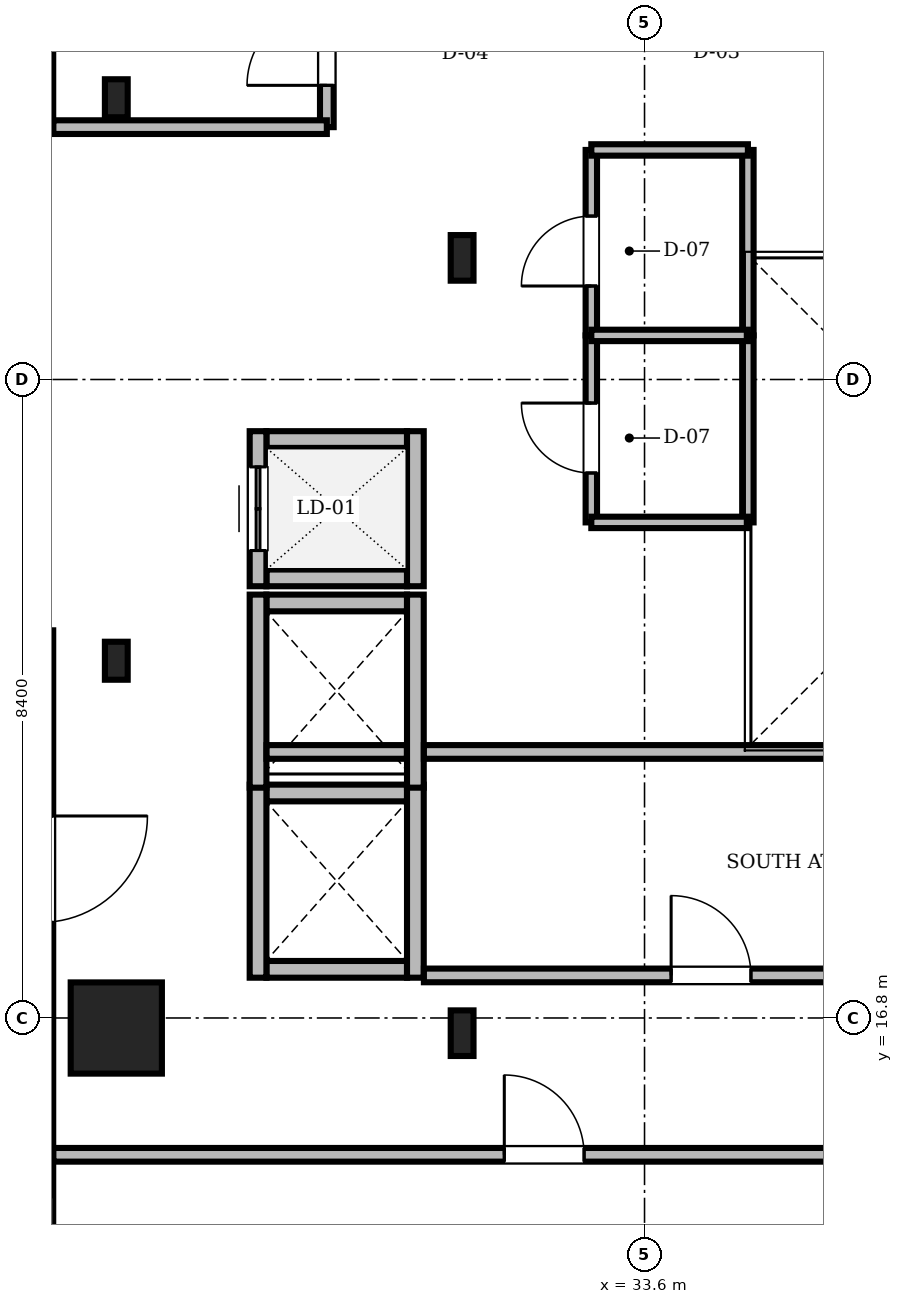
"""IFC4 building model, lengths in metres.
Left out: names, types, materials, properties, quantities, classifications, styles, units other than length and angle.
Written with IfcOpenShell. Run it as: python <this file> out.ifc"""

import sys

from ifc_helpers import new_model, si_unit, direction, frame, frame_2d, origin, origin_2d, place, context, subcontext, project, spatial, rectangle, i_section, extrude, source, transform, mapped, element, fill, save


model = new_model("IFC4")
c1 = context("Model", 3, precision=1e-05, world=origin(), true_north=direction((0.0, 1.0)))
c2 = subcontext(c1, "Body", "Model", "MODEL_VIEW")
j1 = project(units=[si_unit("LENGTHUNIT", "METRE"), si_unit("PLANEANGLEUNIT", "RADIAN")], contexts=[c1])
p1 = place(None, origin())
s1 = spatial("IfcSite", under=j1, at=p1, CompositionType="ELEMENT")
p2 = place(p1, origin())
s2 = spatial("IfcBuilding", under=s1, at=p2, CompositionType="ELEMENT")
p3 = place(p2, frame((0.0, 0.0, 296.15)))
s3 = spatial("IfcBuildingStorey", under=s2, at=p3, CompositionType="ELEMENT", Elevation=296.15)
m1 = source(origin(), c2, "Body", "SweptSolid", [
    extrude(i_section(OverallWidth=0.3, OverallDepth=0.6, WebThickness=0.015, FlangeThickness=0.03, FilletRadius=0.027, at=origin_2d()), origin(), (0.0, 0.0, 1.0), 4.7),
])
for number, where, z_axis, x_axis in (
    (1, (31.2, 16.6, 0.0), (0.0, 0.0, 1.0), (1.0, 0.0, 0.0)),
    (2, (31.2, 26.8, 0.0), (0.0, 0.0, 1.0), (1.0, 0.0, 0.0)),
):
    element("IfcColumn", number, at=place(p3, frame(where, z_axis=z_axis, x_axis=x_axis)), inside=s3, PredefinedType="COLUMN", context=c2, shape_type="MappedRepresentation", body=[
        mapped(m1, transform((0.0, 0.0, 0.0), scale=1.0)),
    ])
m2 = source(origin(), c2, "Body", "SweptSolid", [
    extrude(rectangle(XDim=1.2, YDim=1.2, at=origin_2d()), origin(), (0.0, 0.0, 1.0), 4.738),
])
p4 = place(p3, frame((26.65, 16.668, 0.0), z_axis=(0.113978992753, 0.054103952256, 0.992008846514), x_axis=(-0.428823545912, 0.903388270054, 0.0)))
e3 = element("IfcColumn", 3, at=p4, inside=s3, PredefinedType="COLUMN", context=c2, shape_type="MappedRepresentation", body=[
    mapped(m2, transform((0.0, 0.0, 0.0), scale=1.0)),
])
m3 = source(origin(), c2, "Body", "SweptSolid", [
    extrude(i_section(OverallWidth=0.3, OverallDepth=0.5, WebThickness=0.014, FlangeThickness=0.028, FilletRadius=0.027, at=origin_2d()), origin(), (0.0, 0.0, 1.0), 4.731),
])
for number, where, z_axis, x_axis in (
    (4, (26.65, 28.9, 0.0), (0.114, 0.0, 0.993), (0.0, 1.0, 0.0)),
    (5, (26.65, 21.5, 0.0), (0.114, 0.0, 0.993), (0.0, 1.0, 0.0)),
):
    element("IfcColumn", number, at=place(p3, frame(where, z_axis=z_axis, x_axis=x_axis)), inside=s3, PredefinedType="COLUMN", context=c2, shape_type="MappedRepresentation", body=[
        mapped(m3, transform((0.0, 0.0, 0.0), scale=1.0)),
    ])
m4 = source(origin(), c2, "Body", "SweptSolid", [
    extrude(rectangle(XDim=10.92, YDim=0.32, at=frame_2d((5.46, 0.0))), origin(), (0.0, 0.0, 1.0), 4.7),
])
p5 = place(p3, frame((25.66, 39.42, 0.0), z_axis=(0.0, 0.0, 1.0), x_axis=(0.0, -1.0, 0.0)))
e6 = element("IfcWall", 6, at=p5, inside=s3, PredefinedType="SOLIDWALL", context=c2, shape_type="MappedRepresentation", body=[
    mapped(m4, transform((0.0, 0.0, 0.0), scale=1.0)),
])
m5 = source(origin(), c2, "Body", "SweptSolid", [
    extrude(rectangle(XDim=2.4, YDim=3.2, at=frame_2d((1.2, 1.6))), frame((0.0, 0.17, 0.0), z_axis=(0.0, -1.0, 0.0), x_axis=(1.0, 0.0, 0.0)), (0.0, 0.0, 1.0), 0.34),
])
p6 = place(p5, frame((1.969, 0.0, 0.72)))
e7 = element("IfcOpeningElement", 7, at=p6, cuts=e6, PredefinedType="OPENING", context=c2, shape_type="MappedRepresentation", body=[
    mapped(m5, transform((0.0, 0.0, 0.0), scale=1.0)),
])
p7 = place(p3, frame((25.66, 21.9, 0.0), z_axis=(0.0, 0.0, 1.0), x_axis=(0.0, -1.0, 0.0)))
e8 = element("IfcWall", 8, at=p7, inside=s3, PredefinedType="SOLIDWALL", context=c2, shape_type="MappedRepresentation", body=[
    mapped(m4, transform((0.0, 0.0, 0.0), scale=1.0)),
])
m6 = source(origin(), c2, "Body", "SweptSolid", [
    extrude(rectangle(XDim=1.4, YDim=2.3, at=frame_2d((0.7, 1.15))), frame((0.0, 0.17, 0.0), z_axis=(0.0, -1.0, 0.0), x_axis=(1.0, 0.0, 0.0)), (0.0, 0.0, 1.0), 0.34),
])
p8 = place(p7, frame((2.442, 0.0, 0.0)))
e9 = element("IfcOpeningElement", 9, at=p8, cuts=e8, PredefinedType="OPENING", context=c2, shape_type="MappedRepresentation", body=[
    mapped(m6, transform((0.0, 0.0, 0.0), scale=1.0)),
])
p9 = place(p7, frame((7.451, 0.0, 0.72)))
e10 = element("IfcOpeningElement", 10, at=p9, cuts=e8, PredefinedType="OPENING", context=c2, shape_type="MappedRepresentation", body=[
    mapped(m5, transform((0.0, 0.0, 0.0), scale=1.0)),
])
m7 = source(origin(), c2, "Body", "SweptSolid", [
    extrude(rectangle(XDim=1.85, YDim=0.22, at=frame_2d((0.925, 0.0))), origin(), (0.0, 0.0, 1.0), 4.142),
])
for number, where, z_axis, x_axis in (
    (11, (28.625, 17.44, 0.0), (0.0, 0.0, 1.0), (1.0, 0.0, 0.0)),
    (12, (28.625, 19.76, 0.0), (0.0, 0.0, 1.0), (1.0, 0.0, 0.0)),
):
    element("IfcWall", number, at=place(p3, frame(where, z_axis=z_axis, x_axis=x_axis)), inside=s3, PredefinedType="SOLIDWALL", context=c2, shape_type="MappedRepresentation", body=[
        mapped(m7, transform((0.0, 0.0, 0.0), scale=1.0)),
    ])
m8 = source(origin(), c2, "Body", "SweptSolid", [
    extrude(rectangle(XDim=2.54, YDim=0.22, at=frame_2d((1.27, 0.0))), origin(), (0.0, 0.0, 1.0), 4.142),
])
for number, where, z_axis, x_axis in (
    (13, (28.515, 17.33, 0.0), (0.0, 0.0, 1.0), (0.0, 1.0, 0.0)),
    (14, (30.585, 17.33, 0.0), (0.0, 0.0, 1.0), (0.0, 1.0, 0.0)),
):
    element("IfcWall", number, at=place(p3, frame(where, z_axis=z_axis, x_axis=x_axis)), inside=s3, PredefinedType="SOLIDWALL", context=c2, shape_type="MappedRepresentation", body=[
        mapped(m8, transform((0.0, 0.0, 0.0), scale=1.0)),
    ])
m9 = source(origin(), c2, "Body", "SweptSolid", [
    extrude(rectangle(XDim=1.85, YDim=0.22, at=frame_2d((0.925, 0.0))), origin(), (0.0, 0.0, 1.0), 4.7),
])
p10 = place(p3, frame((28.625, 22.26, 0.0), z_axis=(0.0, 0.0, 1.0), x_axis=(1.0, 0.0, 0.0)))
e15 = element("IfcWall", 15, at=p10, inside=s3, PredefinedType="SOLIDWALL", context=c2, shape_type="MappedRepresentation", body=[
    mapped(m9, transform((0.0, 0.0, 0.0), scale=1.0)),
])
p11 = place(p3, frame((28.515, 19.83, 0.0), z_axis=(0.0, 0.0, 1.0), x_axis=(0.0, 1.0, 0.0)))
e16 = element("IfcWall", 16, at=p11, inside=s3, PredefinedType="SOLIDWALL", context=c2, shape_type="MappedRepresentation", body=[
    mapped(m8, transform((0.0, 0.0, 0.0), scale=1.0)),
])
m10 = source(origin(), c2, "Body", "SweptSolid", [
    extrude(rectangle(XDim=2.54, YDim=0.22, at=frame_2d((1.27, 0.0))), origin(), (0.0, 0.0, 1.0), 4.7),
])
p12 = place(p3, frame((30.585, 19.83, 0.0), z_axis=(0.0, 0.0, 1.0), x_axis=(0.0, 1.0, 0.0)))
e17 = element("IfcWall", 17, at=p12, inside=s3, PredefinedType="SOLIDWALL", context=c2, shape_type="MappedRepresentation", body=[
    mapped(m10, transform((0.0, 0.0, 0.0), scale=1.0)),
])
for number, where, z_axis, x_axis in (
    (18, (28.625, 22.59, 0.0), (0.0, 0.0, 1.0), (1.0, 0.0, 0.0)),
    (19, (28.625, 24.41, 0.0), (0.0, 0.0, 1.0), (1.0, 0.0, 0.0)),
):
    element("IfcWall", number, at=place(p3, frame(where, z_axis=z_axis, x_axis=x_axis)), inside=s3, PredefinedType="SOLIDWALL", context=c2, shape_type="MappedRepresentation", body=[
        mapped(m9, transform((0.0, 0.0, 0.0), scale=1.0)),
    ])
m11 = source(origin(), c2, "Body", "SweptSolid", [
    extrude(rectangle(XDim=2.04, YDim=0.22, at=frame_2d((1.02, 0.0))), origin(), (0.0, 0.0, 1.0), 4.7),
])
p13 = place(p3, frame((28.515, 22.48, 0.0), z_axis=(0.0, 0.0, 1.0), x_axis=(0.0, 1.0, 0.0)))
e20 = element("IfcWall", 20, at=p13, inside=s3, PredefinedType="SOLIDWALL", context=c2, shape_type="MappedRepresentation", body=[
    mapped(m11, transform((0.0, 0.0, 0.0), scale=1.0)),
])
m12 = source(origin(), c2, "Body", "SweptSolid", [
    extrude(rectangle(XDim=1.1, YDim=2.2, at=frame_2d((0.55, 1.1))), frame((0.0, 0.12, 0.0), z_axis=(0.0, -1.0, 0.0), x_axis=(1.0, 0.0, 0.0)), (0.0, 0.0, 1.0), 0.24),
])
p14 = place(p13, frame((0.47, 0.0, 0.0)))
e21 = element("IfcOpeningElement", 21, at=p14, cuts=e20, PredefinedType="OPENING", context=c2, shape_type="MappedRepresentation", body=[
    mapped(m12, transform((0.0, 0.0, 0.0), scale=1.0)),
])
p15 = place(p3, frame((30.585, 22.48, 0.0), z_axis=(0.0, 0.0, 1.0), x_axis=(0.0, 1.0, 0.0)))
e22 = element("IfcWall", 22, at=p15, inside=s3, PredefinedType="SOLIDWALL", context=c2, shape_type="MappedRepresentation", body=[
    mapped(m11, transform((0.0, 0.0, 0.0), scale=1.0)),
])
m13 = source(origin(), c2, "Body", "SweptSolid", [
    extrude(rectangle(XDim=24.478, YDim=0.18, at=frame_2d((12.239, 0.0))), origin(), (0.0, 0.0, 1.0), 3.942),
])
p16 = place(p3, frame((25.822, 15.0, 0.0), z_axis=(0.0, 0.0, 1.0), x_axis=(1.0, 0.0, 0.0)))
e23 = element("IfcWall", 23, at=p16, inside=s3, PredefinedType="PARTITIONING", context=c2, shape_type="MappedRepresentation", body=[
    mapped(m13, transform((0.0, 0.0, 0.0), scale=1.0)),
])
m14 = source(origin(), c2, "Body", "SweptSolid", [
    extrude(rectangle(XDim=1.05, YDim=2.2, at=frame_2d((0.525, 1.1))), frame((0.0, 0.1, 0.0), z_axis=(0.0, -1.0, 0.0), x_axis=(1.0, 0.0, 0.0)), (0.0, 0.0, 1.0), 0.2),
])
p17 = place(p16, frame((5.933, 0.0, 0.0)))
e24 = element("IfcOpeningElement", 24, at=p17, cuts=e23, PredefinedType="OPENING", context=c2, shape_type="MappedRepresentation", body=[
    mapped(m14, transform((0.0, 0.0, 0.0), scale=1.0)),
])
p18 = place(p16, frame((17.158, 0.0, 0.0)))
e25 = element("IfcOpeningElement", 25, at=p18, cuts=e23, PredefinedType="OPENING", context=c2, shape_type="MappedRepresentation", body=[
    mapped(m14, transform((0.0, 0.0, 0.0), scale=1.0)),
])
p19 = place(p16, frame((23.228, 0.0, 0.0)))
e26 = element("IfcOpeningElement", 26, at=p19, cuts=e23, PredefinedType="OPENING", context=c2, shape_type="MappedRepresentation", body=[
    mapped(m14, transform((0.0, 0.0, 0.0), scale=1.0)),
])
m15 = source(origin(), c2, "Body", "SweptSolid", [
    extrude(rectangle(XDim=2.13, YDim=0.18, at=frame_2d((1.065, 0.0))), origin(), (0.0, 0.0, 1.0), 4.332),
])
p20 = place(p3, frame((29.42, 28.52, 0.0), z_axis=(0.0, 0.0, 1.0), x_axis=(0.0, 1.0, 0.0)))
e27 = element("IfcWall", 27, at=p20, inside=s3, PredefinedType="PARTITIONING", context=c2, shape_type="MappedRepresentation", body=[
    mapped(m15, transform((0.0, 0.0, 0.0), scale=1.0)),
])
p21 = place(p20, frame((0.55, 0.0, 0.0)))
e28 = element("IfcOpeningElement", 28, at=p21, cuts=e27, PredefinedType="OPENING", context=c2, shape_type="MappedRepresentation", body=[
    mapped(m14, transform((0.0, 0.0, 0.0), scale=1.0)),
])
m16 = source(origin(), c2, "Body", "SweptSolid", [
    extrude(rectangle(XDim=10.803, YDim=0.18, at=frame_2d((5.401, 0.0))), origin(), (0.0, 0.0, 1.0), 4.142),
])
p22 = place(p3, frame((30.697, 17.36, 0.0), z_axis=(0.0, 0.0, 1.0), x_axis=(1.0, 0.0, 0.0)))
e29 = element("IfcWall", 29, at=p22, inside=s3, PredefinedType="PARTITIONING", context=c2, shape_type="MappedRepresentation", body=[
    mapped(m16, transform((0.0, 0.0, 0.0), scale=1.0)),
])
p23 = place(p22, frame((3.253, 0.0, 0.0)))
e30 = element("IfcOpeningElement", 30, at=p23, cuts=e29, PredefinedType="OPENING", context=c2, shape_type="MappedRepresentation", body=[
    mapped(m14, transform((0.0, 0.0, 0.0), scale=1.0)),
])
m17 = source(origin(), c2, "Body", "SweptSolid", [
    extrude(rectangle(XDim=2.46, YDim=0.15, at=frame_2d((1.23, 0.0))), origin(), (0.0, 0.0, 1.0), 4.7),
])
p24 = place(p3, frame((32.9, 23.32, 0.0), z_axis=(0.0, 0.0, 1.0), x_axis=(0.0, 1.0, 0.0)))
e31 = element("IfcWall", 31, at=p24, inside=s3, PredefinedType="PARTITIONING", context=c2, shape_type="MappedRepresentation", body=[
    mapped(m17, transform((0.0, 0.0, 0.0), scale=1.0)),
])
m18 = source(origin(), c2, "Body", "SweptSolid", [
    extrude(rectangle(XDim=0.92, YDim=2.1, at=frame_2d((0.46, 1.05))), frame((0.0, 0.085, 0.0), z_axis=(0.0, -1.0, 0.0), x_axis=(1.0, 0.0, 0.0)), (0.0, 0.0, 1.0), 0.17),
])
p25 = place(p24, frame((0.65, 0.0, 0.0)))
e32 = element("IfcOpeningElement", 32, at=p25, cuts=e31, PredefinedType="OPENING", context=c2, shape_type="MappedRepresentation", body=[
    mapped(m18, transform((0.0, 0.0, 0.0), scale=1.0)),
])
m19 = source(origin(), c2, "Body", "SweptSolid", [
    extrude(rectangle(XDim=2.44, YDim=0.15, at=frame_2d((1.22, 0.0))), origin(), (0.0, 0.0, 1.0), 4.242),
])
p26 = place(p3, frame((32.9, 25.78, 0.0), z_axis=(0.0, 0.0, 1.0), x_axis=(0.0, 1.0, 0.0)))
e33 = element("IfcWall", 33, at=p26, inside=s3, PredefinedType="PARTITIONING", context=c2, shape_type="MappedRepresentation", body=[
    mapped(m19, transform((0.0, 0.0, 0.0), scale=1.0)),
])
p27 = place(p26, frame((0.65, 0.0, 0.0)))
e34 = element("IfcOpeningElement", 34, at=p27, cuts=e33, PredefinedType="OPENING", context=c2, shape_type="MappedRepresentation", body=[
    mapped(m18, transform((0.0, 0.0, 0.0), scale=1.0)),
])
m20 = source(origin(), c2, "Body", "SweptSolid", [
    extrude(rectangle(XDim=1.846, YDim=0.18, at=frame_2d((0.923, 0.0))), origin(), (0.0, 0.0, 1.0), 4.7),
])
p28 = place(p3, frame((28.627, 20.3, 0.0), z_axis=(0.0, 0.0, 1.0), x_axis=(1.0, 0.0, 0.0)))
e35 = element("IfcWall", 35, at=p28, inside=s3, PredefinedType="PARTITIONING", context=c2, shape_type="MappedRepresentation", body=[
    mapped(m20, transform((0.0, 0.0, 0.0), scale=1.0)),
])
m21 = source(origin(), c2, "Body", "SweptSolid", [
    extrude(rectangle(XDim=10.803, YDim=0.18, at=frame_2d((5.401, 0.0))), origin(), (0.0, 0.0, 1.0), 4.242),
])
p29 = place(p3, frame((30.697, 20.3, 0.0), z_axis=(0.0, 0.0, 1.0), x_axis=(1.0, 0.0, 0.0)))
e36 = element("IfcWall", 36, at=p29, inside=s3, PredefinedType="PARTITIONING", context=c2, shape_type="MappedRepresentation", body=[
    mapped(m21, transform((0.0, 0.0, 0.0), scale=1.0)),
])
m22 = source(origin(), c2, "Body", "SweptSolid", [
    extrude(rectangle(XDim=3.598, YDim=0.18, at=frame_2d((1.799, 0.0))), origin(), (0.0, 0.0, 1.0), 3.942),
])
p30 = place(p3, frame((25.822, 28.52, 0.0), z_axis=(0.0, 0.0, 1.0), x_axis=(1.0, 0.0, 0.0)))
e37 = element("IfcWall", 37, at=p30, inside=s3, PredefinedType="PARTITIONING", context=c2, shape_type="MappedRepresentation", body=[
    mapped(m22, transform((0.0, 0.0, 0.0), scale=1.0)),
])
p31 = place(p3, frame((34.96, 23.32, 0.0), z_axis=(0.0, 0.0, 1.0), x_axis=(0.0, 1.0, 0.0)))
e38 = element("IfcWall", 38, at=p31, inside=s3, PredefinedType="PARTITIONING", context=c2, shape_type="MappedRepresentation", body=[
    mapped(m17, transform((0.0, 0.0, 0.0), scale=1.0)),
])
p32 = place(p3, frame((34.96, 25.78, 0.0), z_axis=(0.0, 0.0, 1.0), x_axis=(0.0, 1.0, 0.0)))
e39 = element("IfcWall", 39, at=p32, inside=s3, PredefinedType="PARTITIONING", context=c2, shape_type="MappedRepresentation", body=[
    mapped(m19, transform((0.0, 0.0, 0.0), scale=1.0)),
])
m23 = source(origin(), c2, "Body", "SweptSolid", [
    extrude(rectangle(XDim=2.06, YDim=0.15, at=frame_2d((1.03, 0.0))), origin(), (0.0, 0.0, 1.0), 4.7),
])
p33 = place(p3, frame((32.9, 25.78, 0.0), z_axis=(0.0, 0.0, 1.0), x_axis=(1.0, 0.0, 0.0)))
e40 = element("IfcWall", 40, at=p33, inside=s3, PredefinedType="PARTITIONING", context=c2, shape_type="MappedRepresentation", body=[
    mapped(m23, transform((0.0, 0.0, 0.0), scale=1.0)),
])
m24 = source(origin(), c2, "Body", "SweptSolid", [
    extrude(rectangle(XDim=2.06, YDim=0.15, at=frame_2d((1.03, 0.0))), origin(), (0.0, 0.0, 1.0), 4.332),
])
p34 = place(p3, frame((32.9, 28.22, 0.0), z_axis=(0.0, 0.0, 1.0), x_axis=(1.0, 0.0, 0.0)))
e41 = element("IfcWall", 41, at=p34, inside=s3, PredefinedType="PARTITIONING", context=c2, shape_type="MappedRepresentation", body=[
    mapped(m24, transform((0.0, 0.0, 0.0), scale=1.0)),
])
p35 = place(p3, frame((32.9, 23.32, 0.0), z_axis=(0.0, 0.0, 1.0), x_axis=(1.0, 0.0, 0.0)))
e42 = element("IfcWall", 42, at=p35, inside=s3, PredefinedType="PARTITIONING", context=c2, shape_type="MappedRepresentation", body=[
    mapped(m23, transform((0.0, 0.0, 0.0), scale=1.0)),
])
m25 = source(origin(), c2, "Body", "SweptSolid", [
    extrude(rectangle(XDim=1.1, YDim=2.2, at=frame_2d((0.55, 1.1))), frame((0.0, 0.025, 0.0), z_axis=(0.0, -1.0, 0.0), x_axis=(1.0, 0.0, 0.0)), (0.0, 0.0, 1.0), 0.05),
])
p36 = place(p14, origin())
e43 = element("IfcDoor", 43, at=p36, inside=s3, OperationType="DOUBLE_DOOR_SLIDING", PredefinedType="DOOR", context=c2, shape_type="MappedRepresentation", body=[
    mapped(m25, transform((0.0, 0.0, 0.0), scale=1.0)),
])
fill(e21, e43)
m26 = source(origin(), c2, "Body", "SweptSolid", [
    extrude(rectangle(XDim=1.05, YDim=2.2, at=frame_2d((0.525, 1.1))), frame((0.0, 0.025, 0.0), z_axis=(0.0, -1.0, 0.0), x_axis=(1.0, 0.0, 0.0)), (0.0, 0.0, 1.0), 0.05),
])
p37 = place(p17, origin())
e44 = element("IfcDoor", 44, at=p37, inside=s3, OperationType="SINGLE_SWING_LEFT", PredefinedType="DOOR", context=c2, shape_type="MappedRepresentation", body=[
    mapped(m26, transform((0.0, 0.0, 0.0), scale=1.0)),
])
fill(e24, e44)
p38 = place(p21, origin())
e45 = element("IfcDoor", 45, at=p38, inside=s3, OperationType="SINGLE_SWING_LEFT", PredefinedType="DOOR", context=c2, shape_type="MappedRepresentation", body=[
    mapped(m26, transform((0.0, 0.0, 0.0), scale=1.0)),
])
fill(e28, e45)
p39 = place(p23, origin())
e46 = element("IfcDoor", 46, at=p39, inside=s3, OperationType="SINGLE_SWING_LEFT", PredefinedType="DOOR", context=c2, shape_type="MappedRepresentation", body=[
    mapped(m26, transform((0.0, 0.0, 0.0), scale=1.0)),
])
fill(e30, e46)
m27 = source(origin(), c2, "Body", "SweptSolid", [
    extrude(rectangle(XDim=0.92, YDim=2.1, at=frame_2d((0.46, 1.05))), frame((0.0, 0.025, 0.0), z_axis=(0.0, -1.0, 0.0), x_axis=(1.0, 0.0, 0.0)), (0.0, 0.0, 1.0), 0.05),
])
p40 = place(p25, origin())
e47 = element("IfcDoor", 47, at=p40, inside=s3, OperationType="SINGLE_SWING_RIGHT", PredefinedType="DOOR", context=c2, shape_type="MappedRepresentation", body=[
    mapped(m27, transform((0.0, 0.0, 0.0), scale=1.0)),
])
fill(e32, e47)
p41 = place(p27, origin())
e48 = element("IfcDoor", 48, at=p41, inside=s3, OperationType="SINGLE_SWING_LEFT", PredefinedType="DOOR", context=c2, shape_type="MappedRepresentation", body=[
    mapped(m27, transform((0.0, 0.0, 0.0), scale=1.0)),
])
fill(e34, e48)
save(model, sys.argv[1])
